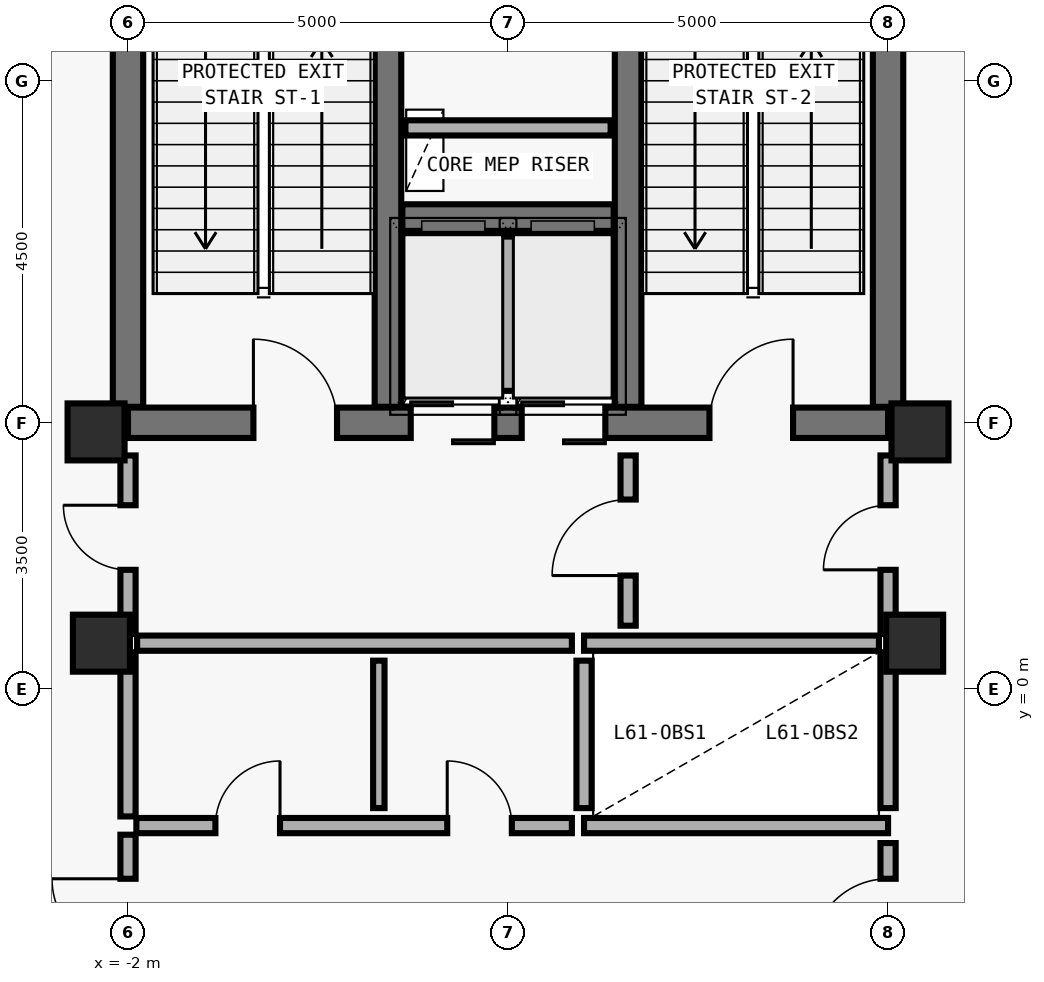
"""IFC4 building model, lengths in metres.
Left out: names, types, materials, properties, quantities, classifications, styles, units other than length and angle.
Written with IfcOpenShell. Run it as: python <this file> out.ifc"""

import sys

from ifc_helpers import new_model, si_unit, direction, frame, frame_2d, origin, origin_2d, place, context, subcontext, project, spatial, rectangle, extrude, element, fill, save


model = new_model("IFC4")
c1 = context("Model", 3, precision=1e-05, world=origin(), true_north=direction((0.0, 1.0)))
c2 = subcontext(c1, "Body", "Model", "MODEL_VIEW")
j1 = project(units=[si_unit("LENGTHUNIT", "METRE"), si_unit("PLANEANGLEUNIT", "RADIAN")], contexts=[c1])
p1 = place(None, origin())
s1 = spatial("IfcSite", under=j1, at=p1, CompositionType="ELEMENT")
p2 = place(p1, origin())
s2 = spatial("IfcBuilding", under=s1, at=p2, CompositionType="ELEMENT")
p3 = place(p2, frame((0.0, 0.0, 240.0)))
s3 = spatial("IfcBuildingStorey", under=s2, at=p3, CompositionType="ELEMENT", Elevation=240.0)
p4 = place(p3, frame((-2.0, 3.5, 0.0), z_axis=(0.0, 0.0, 1.0), x_axis=(1.0, 0.0, 0.0)))
e1 = element("IfcWall", 1, at=p4, inside=s3, PredefinedType="SHEAR", context=c2, shape_type="SweptSolid", body=[
    extrude(rectangle(XDim=10.0, YDim=0.4, at=frame_2d((5.0, 0.0))), origin(), (0.0, 0.0, 1.0), 5.392),
])
p5 = place(p4, frame((1.65, 0.0, 0.0)))
e2 = element("IfcOpeningElement", 2, at=p5, cuts=e1, PredefinedType="OPENING", context=c2, shape_type="SweptSolid", body=[
    extrude(rectangle(XDim=1.1, YDim=2.15, at=frame_2d((0.55, 1.075))), frame((0.0, 0.21, 0.0), z_axis=(0.0, -1.0, 0.0), x_axis=(1.0, 0.0, 0.0)), (0.0, 0.0, 1.0), 0.42),
])
p6 = place(p4, frame((7.65, 0.0, 0.0)))
e3 = element("IfcOpeningElement", 3, at=p6, cuts=e1, PredefinedType="OPENING", context=c2, shape_type="SweptSolid", body=[
    extrude(rectangle(XDim=1.1, YDim=2.15, at=frame_2d((0.55, 1.075))), frame((0.0, 0.21, 0.0), z_axis=(0.0, -1.0, 0.0), x_axis=(1.0, 0.0, 0.0)), (0.0, 0.0, 1.0), 0.42),
])
p7 = place(p4, frame((3.72, 0.0, 0.0)))
e4 = element("IfcOpeningElement", 4, at=p7, cuts=e1, PredefinedType="OPENING", context=c2, shape_type="SweptSolid", body=[
    extrude(rectangle(XDim=1.1, YDim=2.2, at=frame_2d((0.55, 1.1))), frame((0.0, 0.21, 0.0), z_axis=(0.0, -1.0, 0.0), x_axis=(1.0, 0.0, 0.0)), (0.0, 0.0, 1.0), 0.42),
])
p8 = place(p4, frame((5.18, 0.0, 0.0)))
e5 = element("IfcOpeningElement", 5, at=p8, cuts=e1, PredefinedType="OPENING", context=c2, shape_type="SweptSolid", body=[
    extrude(rectangle(XDim=1.1, YDim=2.2, at=frame_2d((0.55, 1.1))), frame((0.0, 0.21, 0.0), z_axis=(0.0, -1.0, 0.0), x_axis=(1.0, 0.0, 0.0)), (0.0, 0.0, 1.0), 0.42),
])
for number, where, z_axis, x_axis in (
    (6, (-2.0, 3.71, 0.0), (0.0, 0.0, 1.0), (0.0, 1.0, 0.0)),
    (7, (8.0, 3.71, 0.0), (0.0, 0.0, 1.0), (0.0, 1.0, 0.0)),
):
    element("IfcWall", number, at=place(p3, frame(where, z_axis=z_axis, x_axis=x_axis)), inside=s3, PredefinedType="SHEAR", context=c2, shape_type="SweptSolid", body=[
        extrude(rectangle(XDim=8.58, YDim=0.4, at=frame_2d((4.29, 0.0))), origin(), (0.0, 0.0, 1.0), 5.392),
    ])
for number, where, z_axis, x_axis in (
    (8, (1.42, 3.71, 0.0), (0.0, 0.0, 1.0), (0.0, 1.0, 0.0)),
    (9, (4.58, 3.71, 0.0), (0.0, 0.0, 1.0), (0.0, 1.0, 0.0)),
):
    element("IfcWall", number, at=place(p3, frame(where, z_axis=z_axis, x_axis=x_axis)), inside=s3, PredefinedType="SHEAR", context=c2, shape_type="SweptSolid", body=[
        extrude(rectangle(XDim=8.58, YDim=0.35, at=frame_2d((4.29, 0.0))), origin(), (0.0, 0.0, 1.0), 5.392),
    ])
p9 = place(p3, frame((1.61, 6.2, 0.0), z_axis=(0.0, 0.0, 1.0), x_axis=(1.0, 0.0, 0.0)))
e10 = element("IfcWall", 10, at=p9, inside=s3, PredefinedType="SHEAR", context=c2, shape_type="SweptSolid", body=[
    extrude(rectangle(XDim=2.78, YDim=0.35, at=frame_2d((1.39, 0.0))), origin(), (0.0, 0.0, 1.0), 5.392),
])
for number, where, z_axis, x_axis in (
    (11, (-2.42, 3.38, 0.0), (0.0, 0.0, 1.0), (1.0, 0.0, 0.0)),
    (12, (8.42, 3.38, 0.0), (0.0, 0.0, 1.0), (1.0, 0.0, 0.0)),
    (13, (-2.35, 0.6, 0.0), (0.0, 0.0, 1.0), (1.0, 0.0, 0.0)),
    (14, (8.35, 0.6, 0.0), (0.0, 0.0, 1.0), (1.0, 0.0, 0.0)),
):
    element("IfcColumn", number, at=place(p3, frame(where, z_axis=z_axis, x_axis=x_axis)), inside=s3, PredefinedType="COLUMN", context=c2, shape_type="SweptSolid", body=[
        extrude(rectangle(XDim=0.75, YDim=0.75, at=origin_2d()), origin(), (0.0, 0.0, 1.0), 5.375),
    ])
p10 = place(p3, frame((3.0, 3.92, 0.0), z_axis=(0.0, 0.0, 1.0), x_axis=(0.0, 1.0, 0.0)))
e15 = element("IfcWall", 15, at=p10, inside=s3, PredefinedType="SOLIDWALL", context=c2, shape_type="SweptSolid", body=[
    extrude(rectangle(XDim=2.03, YDim=0.2, at=frame_2d((1.015, 0.0))), origin(), (0.0, 0.0, 1.0), 5.16),
])
p11 = place(p3, frame((1.65, 7.38, 0.0), z_axis=(0.0, 0.0, 1.0), x_axis=(1.0, 0.0, 0.0)))
e16 = element("IfcWall", 16, at=p11, inside=s3, PredefinedType="SOLIDWALL", context=c2, shape_type="SweptSolid", body=[
    extrude(rectangle(XDim=2.7, YDim=0.2, at=frame_2d((1.35, 0.0))), origin(), (0.0, 0.0, 1.0), 5.16),
])
p12 = place(p3, frame((4.0, 0.6, 0.0), z_axis=(0.0, 0.0, 1.0), x_axis=(1.0, 0.0, 0.0)))
e17 = element("IfcWall", 17, at=p12, inside=s3, PredefinedType="SOLIDWALL", context=c2, shape_type="SweptSolid", body=[
    extrude(rectangle(XDim=3.88, YDim=0.2, at=frame_2d((1.94, 0.0))), origin(), (0.0, 0.0, 1.0), 4.872),
])
p13 = place(p3, frame((4.0, -1.8, 0.0), z_axis=(0.0, 0.0, 1.0), x_axis=(1.0, 0.0, 0.0)))
e18 = element("IfcWall", 18, at=p13, inside=s3, PredefinedType="SOLIDWALL", context=c2, shape_type="SweptSolid", body=[
    extrude(rectangle(XDim=4.0, YDim=0.2, at=frame_2d((2.0, 0.0))), origin(), (0.0, 0.0, 1.0), 5.16),
])
p14 = place(p3, frame((4.0, -1.57, 0.0), z_axis=(0.0, 0.0, 1.0), x_axis=(0.0, 1.0, 0.0)))
e19 = element("IfcWall", 19, at=p14, inside=s3, PredefinedType="SOLIDWALL", context=c2, shape_type="SweptSolid", body=[
    extrude(rectangle(XDim=1.94, YDim=0.2, at=frame_2d((0.97, 0.0))), origin(), (0.0, 0.0, 1.0), 5.16),
])
p15 = place(p3, frame((8.0, -1.57, 0.0), z_axis=(0.0, 0.0, 1.0), x_axis=(0.0, 1.0, 0.0)))
e20 = element("IfcWall", 20, at=p15, inside=s3, PredefinedType="SOLIDWALL", context=c2, shape_type="SweptSolid", body=[
    extrude(rectangle(XDim=2.05, YDim=0.2, at=frame_2d((1.025, 0.0))), origin(), (0.0, 0.0, 1.0), 4.872),
])
p16 = place(p3, frame((4.58, 0.83, 0.0), z_axis=(0.0, 0.0, 1.0), x_axis=(0.0, 1.0, 0.0)))
e21 = element("IfcWall", 21, at=p16, inside=s3, PredefinedType="MOVABLE", context=c2, shape_type="SweptSolid", body=[
    extrude(rectangle(XDim=2.24, YDim=0.2, at=frame_2d((1.12, 0.0))), origin(), (0.0, 0.0, 1.0), 5.16),
])
p17 = place(p16, frame((0.66, 0.0, 0.0)))
e22 = element("IfcOpeningElement", 22, at=p17, cuts=e21, PredefinedType="OPENING", context=c2, shape_type="SweptSolid", body=[
    extrude(rectangle(XDim=1.0, YDim=2.1, at=frame_2d((0.5, 1.05))), frame((0.0, 0.11, 0.0), z_axis=(0.0, -1.0, 0.0), x_axis=(1.0, 0.0, 0.0)), (0.0, 0.0, 1.0), 0.22),
])
p18 = place(p3, frame((-2.0, 0.72, 0.0), z_axis=(0.0, 0.0, 1.0), x_axis=(0.0, 1.0, 0.0)))
e23 = element("IfcWall", 23, at=p18, inside=s3, PredefinedType="MOVABLE", context=c2, shape_type="SweptSolid", body=[
    extrude(rectangle(XDim=2.35, YDim=0.2, at=frame_2d((1.175, 0.0))), origin(), (0.0, 0.0, 1.0), 4.492),
])
p19 = place(p18, frame((0.845, 0.0, 0.0)))
e24 = element("IfcOpeningElement", 24, at=p19, cuts=e23, PredefinedType="OPENING", context=c2, shape_type="SweptSolid", body=[
    extrude(rectangle(XDim=0.85, YDim=2.1, at=frame_2d((0.425, 1.05))), frame((0.0, 0.11, 0.0), z_axis=(0.0, -1.0, 0.0), x_axis=(1.0, 0.0, 0.0)), (0.0, 0.0, 1.0), 0.22),
])
p20 = place(p3, frame((8.0, 0.72, 0.0), z_axis=(0.0, 0.0, 1.0), x_axis=(0.0, 1.0, 0.0)))
e25 = element("IfcWall", 25, at=p20, inside=s3, PredefinedType="MOVABLE", context=c2, shape_type="SweptSolid", body=[
    extrude(rectangle(XDim=2.35, YDim=0.2, at=frame_2d((1.175, 0.0))), origin(), (0.0, 0.0, 1.0), 4.492),
])
p21 = place(p20, frame((0.845, 0.0, 0.0)))
e26 = element("IfcOpeningElement", 26, at=p21, cuts=e25, PredefinedType="OPENING", context=c2, shape_type="SweptSolid", body=[
    extrude(rectangle(XDim=0.85, YDim=2.1, at=frame_2d((0.425, 1.05))), frame((0.0, 0.11, 0.0), z_axis=(0.0, -1.0, 0.0), x_axis=(1.0, 0.0, 0.0)), (0.0, 0.0, 1.0), 0.22),
])
p22 = place(p3, frame((-2.0, -4.08, 0.0), z_axis=(0.0, 0.0, 1.0), x_axis=(0.0, 1.0, 0.0)))
e27 = element("IfcWall", 27, at=p22, inside=s3, PredefinedType="MOVABLE", context=c2, shape_type="SweptSolid", body=[
    extrude(rectangle(XDim=2.16, YDim=0.2, at=frame_2d((1.08, 0.0))), origin(), (0.0, 0.0, 1.0), 4.872),
])
p23 = place(p22, frame((0.58, 0.0, 0.0)))
e28 = element("IfcOpeningElement", 28, at=p23, cuts=e27, PredefinedType="OPENING", context=c2, shape_type="SweptSolid", body=[
    extrude(rectangle(XDim=1.0, YDim=2.1, at=frame_2d((0.5, 1.05))), frame((0.0, 0.11, 0.0), z_axis=(0.0, -1.0, 0.0), x_axis=(1.0, 0.0, 0.0)), (0.0, 0.0, 1.0), 0.22),
])
p24 = place(p3, frame((8.0, -3.97, 0.0), z_axis=(0.0, 0.0, 1.0), x_axis=(0.0, 1.0, 0.0)))
e29 = element("IfcWall", 29, at=p24, inside=s3, PredefinedType="MOVABLE", context=c2, shape_type="SweptSolid", body=[
    extrude(rectangle(XDim=1.94, YDim=0.2, at=frame_2d((0.97, 0.0))), origin(), (0.0, 0.0, 1.0), 4.872),
])
p25 = place(p24, frame((0.47, 0.0, 0.0)))
e30 = element("IfcOpeningElement", 30, at=p25, cuts=e29, PredefinedType="OPENING", context=c2, shape_type="SweptSolid", body=[
    extrude(rectangle(XDim=1.0, YDim=2.1, at=frame_2d((0.5, 1.05))), frame((0.0, 0.11, 0.0), z_axis=(0.0, -1.0, 0.0), x_axis=(1.0, 0.0, 0.0)), (0.0, 0.0, 1.0), 0.22),
])
p26 = place(p3, frame((-1.89, -1.8, 0.0), z_axis=(0.0, 0.0, 1.0), x_axis=(1.0, 0.0, 0.0)))
e31 = element("IfcWall", 31, at=p26, inside=s3, PredefinedType="MOVABLE", context=c2, shape_type="SweptSolid", body=[
    extrude(rectangle(XDim=5.73, YDim=0.2, at=frame_2d((2.865, 0.0))), origin(), (0.0, 0.0, 1.0), 5.16),
])
p27 = place(p26, frame((1.04, 0.0, 0.0)))
e32 = element("IfcOpeningElement", 32, at=p27, cuts=e31, PredefinedType="OPENING", context=c2, shape_type="SweptSolid", body=[
    extrude(rectangle(XDim=0.85, YDim=2.1, at=frame_2d((0.425, 1.05))), frame((0.0, 0.11, 0.0), z_axis=(0.0, -1.0, 0.0), x_axis=(1.0, 0.0, 0.0)), (0.0, 0.0, 1.0), 0.22),
])
p28 = place(p26, frame((4.09, 0.0, 0.0)))
e33 = element("IfcOpeningElement", 33, at=p28, cuts=e31, PredefinedType="OPENING", context=c2, shape_type="SweptSolid", body=[
    extrude(rectangle(XDim=0.85, YDim=2.1, at=frame_2d((0.425, 1.05))), frame((0.0, 0.11, 0.0), z_axis=(0.0, -1.0, 0.0), x_axis=(1.0, 0.0, 0.0)), (0.0, 0.0, 1.0), 0.22),
])
p29 = place(p3, frame((-1.88, 0.6, 0.0), z_axis=(0.0, 0.0, 1.0), x_axis=(1.0, 0.0, 0.0)))
e34 = element("IfcWall", 34, at=p29, inside=s3, PredefinedType="MOVABLE", context=c2, shape_type="SweptSolid", body=[
    extrude(rectangle(XDim=5.72, YDim=0.2, at=frame_2d((2.86, 0.0))), origin(), (0.0, 0.0, 1.0), 4.872),
])
p30 = place(p3, frame((1.3, -1.57, 0.0), z_axis=(0.0, 0.0, 1.0), x_axis=(0.0, 1.0, 0.0)))
e35 = element("IfcWall", 35, at=p30, inside=s3, PredefinedType="PARTITIONING", context=c2, shape_type="SweptSolid", body=[
    extrude(rectangle(XDim=1.94, YDim=0.15, at=frame_2d((0.97, 0.0))), origin(), (0.0, 0.0, 1.0), 5.16),
])
p31 = place(p3, frame((-2.0, -1.68, 0.0), z_axis=(0.0, 0.0, 1.0), x_axis=(0.0, 1.0, 0.0)))
e36 = element("IfcWall", 36, at=p31, inside=s3, PredefinedType="MOVABLE", context=c2, shape_type="SweptSolid", body=[
    extrude(rectangle(XDim=2.16, YDim=0.2, at=frame_2d((1.08, 0.0))), origin(), (0.0, 0.0, 1.0), 4.872),
])
p32 = place(p5, origin())
e37 = element("IfcDoor", 37, at=p32, inside=s3, OperationType="SINGLE_SWING_LEFT", PredefinedType="DOOR", context=c2, shape_type="SweptSolid", body=[
    extrude(rectangle(XDim=1.1, YDim=2.15, at=frame_2d((0.55, 1.075))), frame((0.0, 0.025, 0.0), z_axis=(0.0, -1.0, 0.0), x_axis=(1.0, 0.0, 0.0)), (0.0, 0.0, 1.0), 0.05),
])
fill(e2, e37)
p33 = place(p6, origin())
e38 = element("IfcDoor", 38, at=p33, inside=s3, OperationType="SINGLE_SWING_RIGHT", PredefinedType="DOOR", context=c2, shape_type="SweptSolid", body=[
    extrude(rectangle(XDim=1.1, YDim=2.15, at=frame_2d((0.55, 1.075))), frame((0.0, 0.025, 0.0), z_axis=(0.0, -1.0, 0.0), x_axis=(1.0, 0.0, 0.0)), (0.0, 0.0, 1.0), 0.05),
])
fill(e3, e38)
p34 = place(p7, origin())
e39 = element("IfcDoor", 39, at=p34, inside=s3, OperationType="DOUBLE_DOOR_SLIDING", PredefinedType="DOOR", context=c2, shape_type="SweptSolid", body=[
    extrude(rectangle(XDim=1.1, YDim=2.2, at=frame_2d((0.55, 1.1))), frame((0.0, 0.025, 0.0), z_axis=(0.0, -1.0, 0.0), x_axis=(1.0, 0.0, 0.0)), (0.0, 0.0, 1.0), 0.05),
])
fill(e4, e39)
p35 = place(p8, origin())
e40 = element("IfcDoor", 40, at=p35, inside=s3, OperationType="DOUBLE_DOOR_SLIDING", PredefinedType="DOOR", context=c2, shape_type="SweptSolid", body=[
    extrude(rectangle(XDim=1.1, YDim=2.2, at=frame_2d((0.55, 1.1))), frame((0.0, 0.025, 0.0), z_axis=(0.0, -1.0, 0.0), x_axis=(1.0, 0.0, 0.0)), (0.0, 0.0, 1.0), 0.05),
])
fill(e5, e40)
p36 = place(p17, origin())
e41 = element("IfcDoor", 41, at=p36, inside=s3, OperationType="SINGLE_SWING_LEFT", PredefinedType="DOOR", context=c2, shape_type="SweptSolid", body=[
    extrude(rectangle(XDim=1.0, YDim=2.1, at=frame_2d((0.5, 1.05))), frame((0.0, 0.025, 0.0), z_axis=(0.0, -1.0, 0.0), x_axis=(1.0, 0.0, 0.0)), (0.0, 0.0, 1.0), 0.05),
])
fill(e22, e41)
p37 = place(p19, origin())
e42 = element("IfcDoor", 42, at=p37, inside=s3, OperationType="SINGLE_SWING_RIGHT", PredefinedType="DOOR", context=c2, shape_type="SweptSolid", body=[
    extrude(rectangle(XDim=0.85, YDim=2.1, at=frame_2d((0.425, 1.05))), frame((0.0, 0.025, 0.0), z_axis=(0.0, -1.0, 0.0), x_axis=(1.0, 0.0, 0.0)), (0.0, 0.0, 1.0), 0.05),
])
fill(e24, e42)
p38 = place(p21, origin())
e43 = element("IfcDoor", 43, at=p38, inside=s3, OperationType="SINGLE_SWING_LEFT", PredefinedType="DOOR", context=c2, shape_type="SweptSolid", body=[
    extrude(rectangle(XDim=0.85, YDim=2.1, at=frame_2d((0.425, 1.05))), frame((0.0, 0.025, 0.0), z_axis=(0.0, -1.0, 0.0), x_axis=(1.0, 0.0, 0.0)), (0.0, 0.0, 1.0), 0.05),
])
fill(e26, e43)
p39 = place(p23, origin())
e44 = element("IfcDoor", 44, at=p39, inside=s3, OperationType="SINGLE_SWING_RIGHT", PredefinedType="DOOR", context=c2, shape_type="SweptSolid", body=[
    extrude(rectangle(XDim=1.0, YDim=2.1, at=frame_2d((0.5, 1.05))), frame((0.0, 0.025, 0.0), z_axis=(0.0, -1.0, 0.0), x_axis=(1.0, 0.0, 0.0)), (0.0, 0.0, 1.0), 0.05),
])
fill(e28, e44)
p40 = place(p25, origin())
e45 = element("IfcDoor", 45, at=p40, inside=s3, OperationType="SINGLE_SWING_LEFT", PredefinedType="DOOR", context=c2, shape_type="SweptSolid", body=[
    extrude(rectangle(XDim=1.0, YDim=2.1, at=frame_2d((0.5, 1.05))), frame((0.0, 0.025, 0.0), z_axis=(0.0, -1.0, 0.0), x_axis=(1.0, 0.0, 0.0)), (0.0, 0.0, 1.0), 0.05),
])
fill(e30, e45)
p41 = place(p27, origin())
e46 = element("IfcDoor", 46, at=p41, inside=s3, OperationType="SINGLE_SWING_RIGHT", PredefinedType="DOOR", context=c2, shape_type="SweptSolid", body=[
    extrude(rectangle(XDim=0.85, YDim=2.1, at=frame_2d((0.425, 1.05))), frame((0.0, 0.025, 0.0), z_axis=(0.0, -1.0, 0.0), x_axis=(1.0, 0.0, 0.0)), (0.0, 0.0, 1.0), 0.05),
])
fill(e32, e46)
p42 = place(p28, origin())
e47 = element("IfcDoor", 47, at=p42, inside=s3, OperationType="SINGLE_SWING_LEFT", PredefinedType="DOOR", context=c2, shape_type="SweptSolid", body=[
    extrude(rectangle(XDim=0.85, YDim=2.1, at=frame_2d((0.425, 1.05))), frame((0.0, 0.025, 0.0), z_axis=(0.0, -1.0, 0.0), x_axis=(1.0, 0.0, 0.0)), (0.0, 0.0, 1.0), 0.05),
])
fill(e33, e47)
save(model, sys.argv[1])
